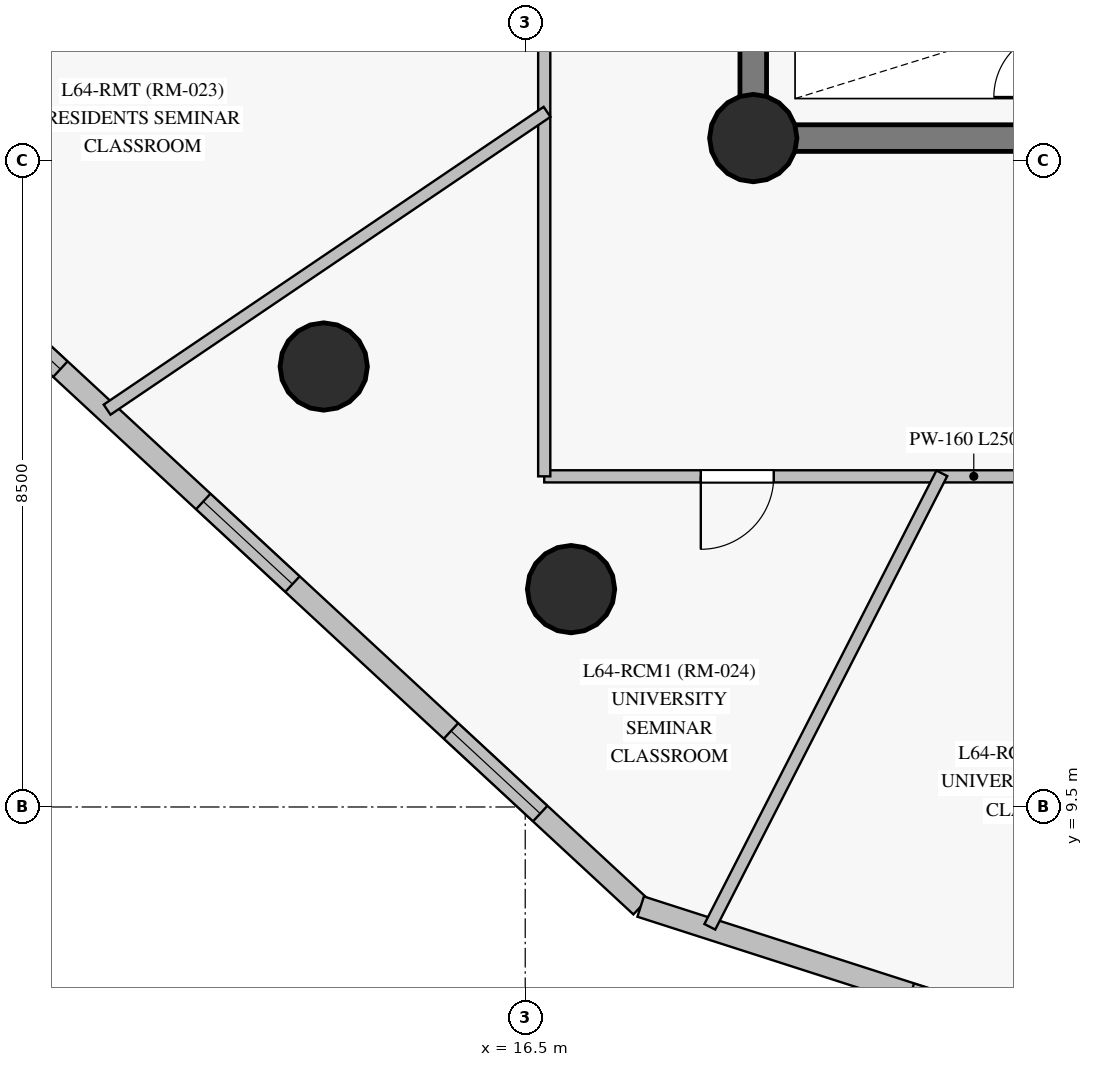
"""IFC4 building model, lengths in metres.
Left out: names, types, materials, properties, quantities, classifications, styles, units other than length and angle.
Written with IfcOpenShell. Run it as: python <this file> out.ifc"""

import sys

from ifc_helpers import new_model, si_unit, direction, frame, frame_2d, origin, origin_with_axes, origin_2d, place, context, subcontext, project, spatial, rectangle, circle, extrude, source, transform, mapped, element, fill, save


model = new_model("IFC4")
c1 = context("Model", 3, precision=1e-05, world=origin(), true_north=direction((0.0, 1.0)))
c2 = subcontext(c1, "Body", "Model", "MODEL_VIEW")
j1 = project(units=[si_unit("LENGTHUNIT", "METRE"), si_unit("PLANEANGLEUNIT", "RADIAN")], contexts=[c1])
p1 = place(None, origin())
s1 = spatial("IfcSite", under=j1, at=p1, CompositionType="ELEMENT")
p2 = place(p1, origin())
s2 = spatial("IfcBuilding", under=s1, at=p2, CompositionType="ELEMENT")
p3 = place(p2, frame((0.0, 0.0, 219.95)))
s3 = spatial("IfcBuildingStorey", under=s2, at=p3, CompositionType="ELEMENT", Elevation=219.95)
p4 = place(p3, frame((19.5, 18.3, 0.0), z_axis=(0.0, 0.0, 1.0), x_axis=(1.0, 0.0, 0.0)))
e1 = element("IfcWall", 1, at=p4, inside=s3, PredefinedType="SHEAR", context=c2, shape_type="SweptSolid", body=[
    extrude(rectangle(XDim=7.05, YDim=0.35, at=frame_2d((3.525, 0.0))), origin(), (0.0, 0.0, 1.0), 2.85),
])
p5 = place(p4, frame((4.2, 0.0, 0.0)))
e2 = element("IfcOpeningElement", 2, at=p5, cuts=e1, PredefinedType="OPENING", context=c2, shape_type="SweptSolid", body=[
    extrude(rectangle(XDim=1.4, YDim=2.2, at=frame_2d((0.7, 1.1))), frame((0.0, 0.185, 0.0), z_axis=(0.0, -1.0, 0.0), x_axis=(1.0, 0.0, 0.0)), (0.0, 0.0, 1.0), 0.37),
])
p6 = place(p3, frame((19.5, 34.7, 0.0), z_axis=(0.0, 0.0, 1.0), x_axis=(0.0, -1.0, 0.0)))
e3 = element("IfcWall", 3, at=p6, inside=s3, PredefinedType="SHEAR", context=c2, shape_type="SweptSolid", body=[
    extrude(rectangle(XDim=16.4, YDim=0.35, at=frame_2d((8.2, 0.0))), origin(), (0.0, 0.0, 1.0), 2.85),
])
p7 = place(p6, frame((3.24, 0.0, 0.0)))
e4 = element("IfcOpeningElement", 4, at=p7, cuts=e3, PredefinedType="OPENING", context=c2, shape_type="SweptSolid", body=[
    extrude(rectangle(XDim=1.1, YDim=2.15, at=frame_2d((0.55, 1.075))), frame((0.0, 0.185, 0.0), z_axis=(0.0, -1.0, 0.0), x_axis=(1.0, 0.0, 0.0)), (0.0, 0.0, 1.0), 0.37),
])
m1 = source(origin_with_axes(), c2, "Body", "SweptSolid", [
    extrude(circle(Radius=0.575, at=origin_2d()), origin(), (0.0, 0.0, 1.0), 3.05),
])
for number, where, z_axis, x_axis in (
    (5, (19.5, 18.3, 0.0), (0.0, 0.0, 1.0), (1.0, 0.0, 0.0)),
    (6, (13.849, 15.295, 0.0), (0.0, 0.0, 1.0), (1.0, 0.0, 0.0)),
    (7, (17.103, 12.366, 0.0), (0.0, 0.0, 1.0), (1.0, 0.0, 0.0)),
):
    element("IfcColumn", number, at=place(p3, frame(where, z_axis=z_axis, x_axis=x_axis)), inside=s3, PredefinedType="COLUMN", context=c2, shape_type="MappedRepresentation", body=[
        mapped(m1, transform((0.0, 0.0, 0.0), scale=1.0)),
    ])
p8 = place(p3, frame((8.564, 16.946, 0.0), z_axis=(0.0, 0.0, 1.0), x_axis=(0.733643128565, -0.679534958563, 0.0)))
e8 = element("IfcWall", 8, at=p8, inside=s3, PredefinedType="SOLIDWALL", context=c2, shape_type="SweptSolid", body=[
    extrude(rectangle(XDim=12.886, YDim=0.28, at=frame_2d((6.443, 0.0))), origin(), (0.0, 0.0, 1.0), 2.85),
])
p9 = place(p8, frame((0.881, 0.0, 0.85)))
e9 = element("IfcOpeningElement", 9, at=p9, cuts=e8, PredefinedType="OPENING", context=c2, shape_type="SweptSolid", body=[
    extrude(rectangle(XDim=1.6, YDim=1.6, at=frame_2d((0.8, 0.8))), frame((0.0, 0.15, 0.0), z_axis=(0.0, -1.0, 0.0), x_axis=(1.0, 0.0, 0.0)), (0.0, 0.0, 1.0), 0.3),
])
p10 = place(p8, frame((5.043, 0.0, 0.85)))
e10 = element("IfcOpeningElement", 10, at=p10, cuts=e8, PredefinedType="OPENING", context=c2, shape_type="SweptSolid", body=[
    extrude(rectangle(XDim=1.6, YDim=1.6, at=frame_2d((0.8, 0.8))), frame((0.0, 0.15, 0.0), z_axis=(0.0, -1.0, 0.0), x_axis=(1.0, 0.0, 0.0)), (0.0, 0.0, 1.0), 0.3),
])
p11 = place(p8, frame((9.485, 0.0, 0.85)))
e11 = element("IfcOpeningElement", 11, at=p11, cuts=e8, PredefinedType="OPENING", context=c2, shape_type="SweptSolid", body=[
    extrude(rectangle(XDim=1.6, YDim=1.6, at=frame_2d((0.8, 0.8))), frame((0.0, 0.15, 0.0), z_axis=(0.0, -1.0, 0.0), x_axis=(1.0, 0.0, 0.0)), (0.0, 0.0, 1.0), 0.3),
])
p12 = place(p3, frame((18.019, 8.189, 0.0), z_axis=(0.0, 0.0, 1.0), x_axis=(0.95200774136, -0.306073945951, 0.0)))
e12 = element("IfcWall", 12, at=p12, inside=s3, PredefinedType="SOLIDWALL", context=c2, shape_type="SweptSolid", body=[
    extrude(rectangle(XDim=9.64, YDim=0.28, at=frame_2d((4.82, 0.0))), origin(), (0.0, 0.0, 1.0), 2.85),
])
p13 = place(p12, frame((3.733, 0.0, 0.85)))
e13 = element("IfcOpeningElement", 13, at=p13, cuts=e12, PredefinedType="OPENING", context=c2, shape_type="SweptSolid", body=[
    extrude(rectangle(XDim=1.6, YDim=1.6, at=frame_2d((0.8, 0.8))), frame((0.0, 0.15, 0.0), z_axis=(0.0, -1.0, 0.0), x_axis=(1.0, 0.0, 0.0)), (0.0, 0.0, 1.0), 0.3),
])
p14 = place(p3, frame((41.8, 13.85, 0.0), z_axis=(0.0, 0.0, 1.0), x_axis=(-1.0, 0.0, 0.0)))
e14 = element("IfcWall", 14, at=p14, inside=s3, PredefinedType="PARTITIONING", context=c2, shape_type="SweptSolid", body=[
    extrude(rectangle(XDim=25.05, YDim=0.16, at=frame_2d((12.525, 0.0))), origin(), (0.0, 0.0, 1.0), 2.3),
])
p15 = place(p14, frame((22.03, 0.0, 0.0)))
e15 = element("IfcOpeningElement", 15, at=p15, cuts=e14, PredefinedType="OPENING", context=c2, shape_type="SweptSolid", body=[
    extrude(rectangle(XDim=0.96, YDim=2.15, at=frame_2d((0.48, 1.075))), frame((0.0, 0.09, 0.0), z_axis=(0.0, -1.0, 0.0), x_axis=(1.0, 0.0, 0.0)), (0.0, 0.0, 1.0), 0.18),
])
p16 = place(p14, frame((15.808, 0.0, 0.0)))
e16 = element("IfcOpeningElement", 16, at=p16, cuts=e14, PredefinedType="OPENING", context=c2, shape_type="SweptSolid", body=[
    extrude(rectangle(XDim=0.96, YDim=2.15, at=frame_2d((0.48, 1.075))), frame((0.0, 0.09, 0.0), z_axis=(0.0, -1.0, 0.0), x_axis=(1.0, 0.0, 0.0)), (0.0, 0.0, 1.0), 0.18),
])
p17 = place(p14, frame((12.05, 0.0, 0.0)))
e17 = element("IfcOpeningElement", 17, at=p17, cuts=e14, PredefinedType="OPENING", context=c2, shape_type="SweptSolid", body=[
    extrude(rectangle(XDim=0.96, YDim=2.15, at=frame_2d((0.48, 1.075))), frame((0.0, 0.09, 0.0), z_axis=(0.0, -1.0, 0.0), x_axis=(1.0, 0.0, 0.0)), (0.0, 0.0, 1.0), 0.18),
])
p18 = place(p14, frame((8.292, 0.0, 0.0)))
e18 = element("IfcOpeningElement", 18, at=p18, cuts=e14, PredefinedType="OPENING", context=c2, shape_type="SweptSolid", body=[
    extrude(rectangle(XDim=0.96, YDim=2.15, at=frame_2d((0.48, 1.075))), frame((0.0, 0.09, 0.0), z_axis=(0.0, -1.0, 0.0), x_axis=(1.0, 0.0, 0.0)), (0.0, 0.0, 1.0), 0.18),
])
p19 = place(p14, frame((3.184, 0.0, 0.0)))
e19 = element("IfcOpeningElement", 19, at=p19, cuts=e14, PredefinedType="OPENING", context=c2, shape_type="SweptSolid", body=[
    extrude(rectangle(XDim=0.86, YDim=2.04, at=frame_2d((0.43, 1.02))), frame((0.0, 0.09, 0.0), z_axis=(0.0, -1.0, 0.0), x_axis=(1.0, 0.0, 0.0)), (0.0, 0.0, 1.0), 0.18),
])
p20 = place(p3, frame((16.75, 13.85, 0.0), z_axis=(0.0, 0.0, 1.0), x_axis=(0.0, 1.0, 0.0)))
e20 = element("IfcWall", 20, at=p20, inside=s3, PredefinedType="PARTITIONING", context=c2, shape_type="SweptSolid", body=[
    extrude(rectangle(XDim=17.8, YDim=0.16, at=frame_2d((8.9, 0.0))), origin(), (0.0, 0.0, 1.0), 2.45),
])
p21 = place(p20, frame((12.992, 0.0, 0.0)))
e21 = element("IfcOpeningElement", 21, at=p21, cuts=e20, PredefinedType="OPENING", context=c2, shape_type="SweptSolid", body=[
    extrude(rectangle(XDim=0.96, YDim=2.15, at=frame_2d((0.48, 1.075))), frame((0.0, 0.09, 0.0), z_axis=(0.0, -1.0, 0.0), x_axis=(1.0, 0.0, 0.0)), (0.0, 0.0, 1.0), 0.18),
])
p22 = place(p20, frame((7.985, 0.0, 0.0)))
e22 = element("IfcOpeningElement", 22, at=p22, cuts=e20, PredefinedType="OPENING", context=c2, shape_type="SweptSolid", body=[
    extrude(rectangle(XDim=0.96, YDim=2.15, at=frame_2d((0.48, 1.075))), frame((0.0, 0.09, 0.0), z_axis=(0.0, -1.0, 0.0), x_axis=(1.0, 0.0, 0.0)), (0.0, 0.0, 1.0), 0.18),
])
p23 = place(p3, frame((16.787, 18.645, 0.0), z_axis=(0.0, 0.0, 1.0), x_axis=(-0.828133669323, -0.560530664401, 0.0)))
e23 = element("IfcWall", 23, at=p23, inside=s3, PredefinedType="PARTITIONING", context=c2, shape_type="SweptSolid", body=[
    extrude(rectangle(XDim=6.989, YDim=0.16, at=frame_2d((3.495, 0.0))), origin(), (0.0, 0.0, 1.0), 2.85),
])
p24 = place(p3, frame((21.981, 13.89, 0.0), z_axis=(0.0, 0.0, 1.0), x_axis=(-0.455471104302, -0.890250567619, 0.0)))
e24 = element("IfcWall", 24, at=p24, inside=s3, PredefinedType="PARTITIONING", context=c2, shape_type="SweptSolid", body=[
    extrude(rectangle(XDim=6.702, YDim=0.16, at=frame_2d((3.351, 0.0))), origin(), (0.0, 0.0, 1.0), 2.85),
])
m2 = source(origin_with_axes(), c2, "Body", "SweptSolid", [
    extrude(rectangle(XDim=1.6, YDim=1.6, at=frame_2d((0.8, 0.8))), frame((0.0, 0.03, 0.0), z_axis=(0.0, -1.0, 0.0), x_axis=(1.0, 0.0, 0.0)), (0.0, 0.0, 1.0), 0.06),
])
p25 = place(p9, origin())
e25 = element("IfcWindow", 25, at=p25, inside=s3, PartitioningType="SINGLE_PANEL", PredefinedType="WINDOW", context=c2, shape_type="MappedRepresentation", body=[
    mapped(m2, transform((0.0, 0.0, 0.0), scale=1.0)),
])
fill(e9, e25)
p26 = place(p10, origin())
e26 = element("IfcWindow", 26, at=p26, inside=s3, PartitioningType="SINGLE_PANEL", PredefinedType="WINDOW", context=c2, shape_type="MappedRepresentation", body=[
    mapped(m2, transform((0.0, 0.0, 0.0), scale=1.0)),
])
fill(e10, e26)
p27 = place(p11, origin())
e27 = element("IfcWindow", 27, at=p27, inside=s3, PartitioningType="SINGLE_PANEL", PredefinedType="WINDOW", context=c2, shape_type="MappedRepresentation", body=[
    mapped(m2, transform((0.0, 0.0, 0.0), scale=1.0)),
])
fill(e11, e27)
m3 = source(origin_with_axes(), c2, "Body", "SweptSolid", [
    extrude(rectangle(XDim=0.96, YDim=2.15, at=frame_2d((0.48, 1.075))), frame((0.0, 0.025, 0.0), z_axis=(0.0, -1.0, 0.0), x_axis=(1.0, 0.0, 0.0)), (0.0, 0.0, 1.0), 0.05),
])
p28 = place(p15, origin())
e28 = element("IfcDoor", 28, at=p28, inside=s3, OperationType="SINGLE_SWING_RIGHT", PredefinedType="DOOR", context=c2, shape_type="MappedRepresentation", body=[
    mapped(m3, transform((0.0, 0.0, 0.0), scale=1.0)),
])
fill(e15, e28)
save(model, sys.argv[1])
